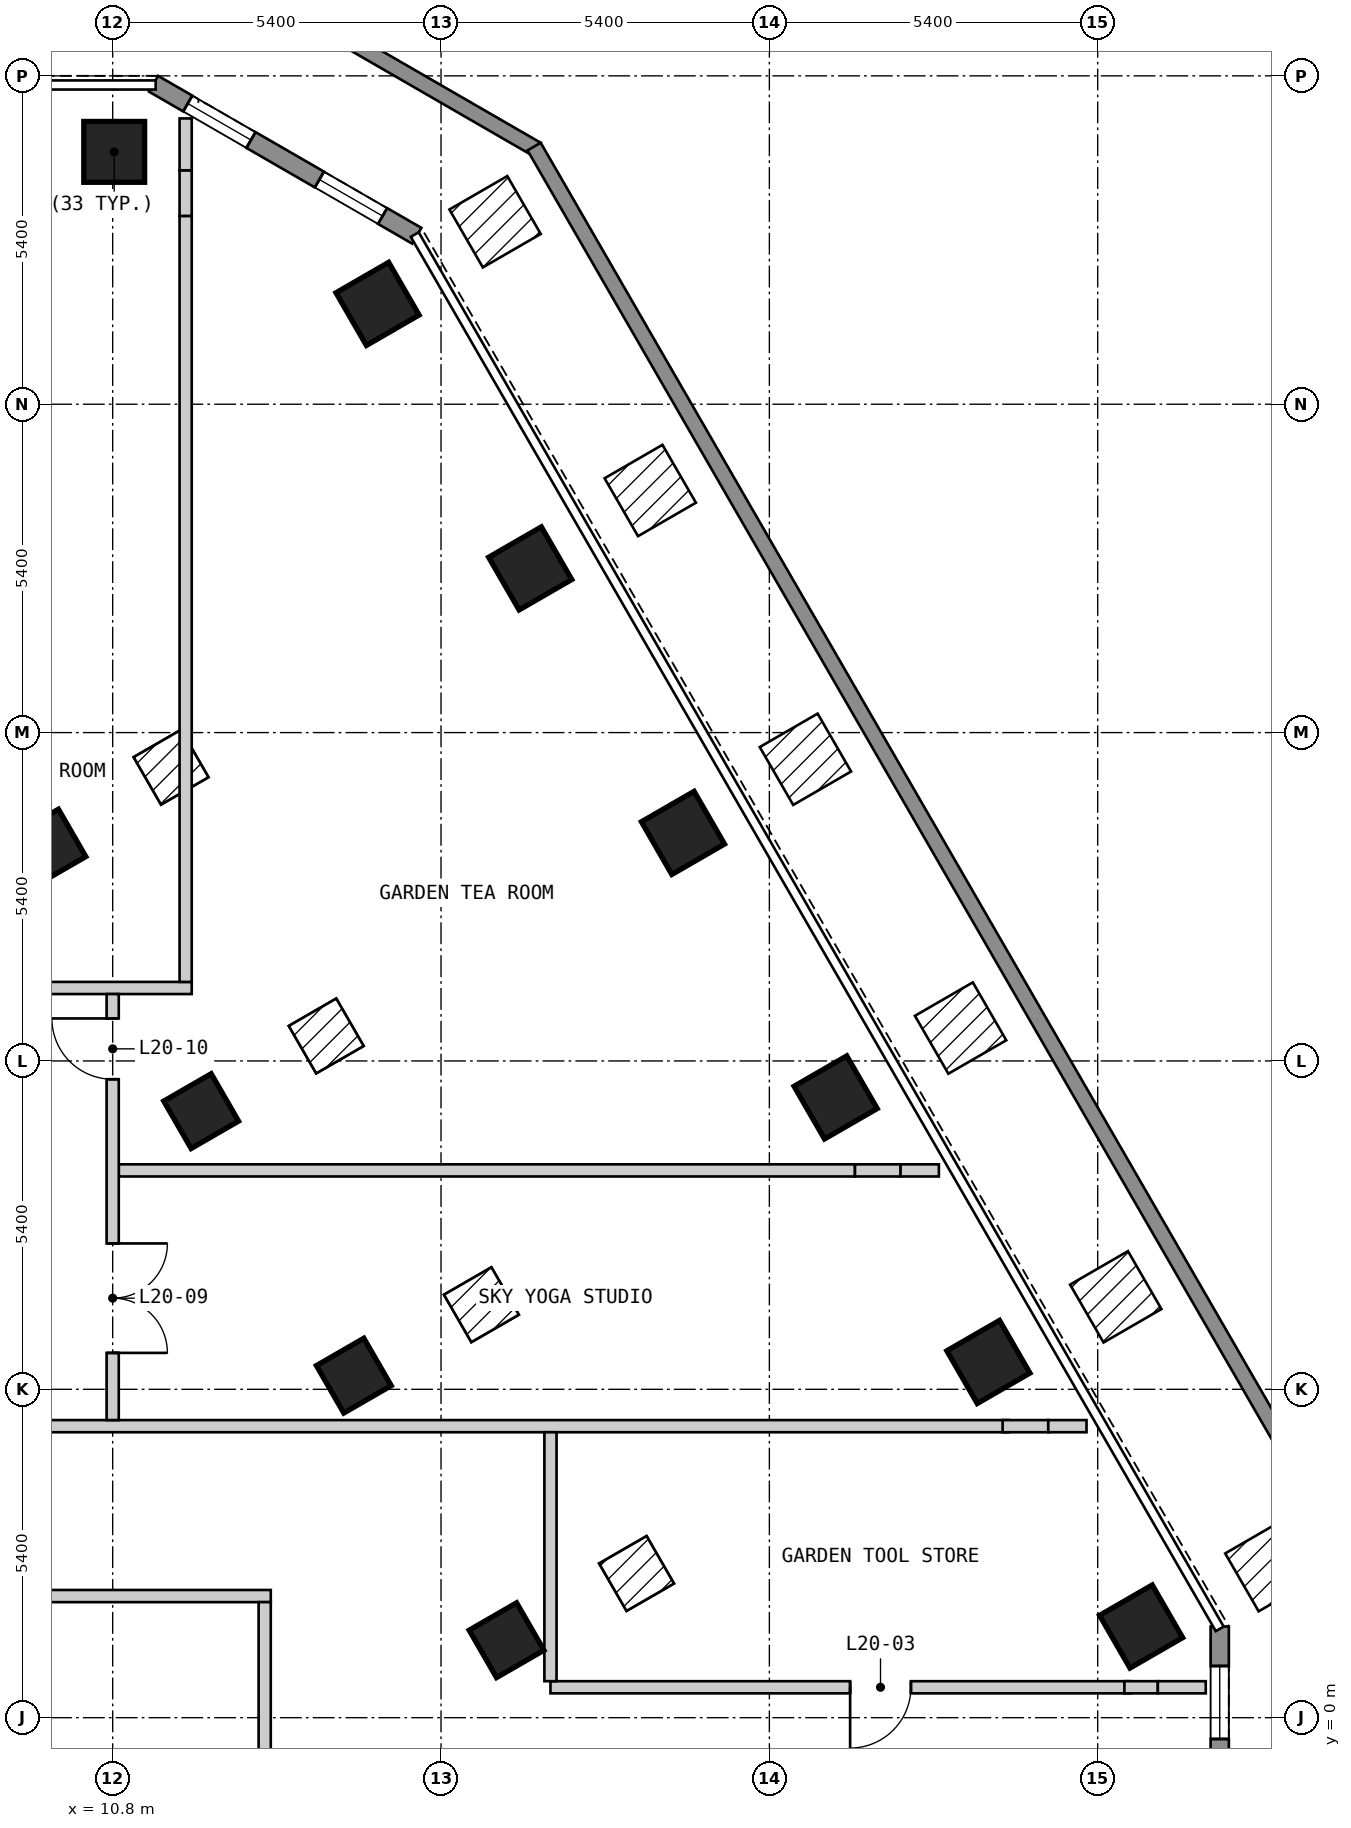
"""IFC4 building model, lengths in metres.
Left out: names, types, materials, properties, quantities, classifications, styles, units other than length and angle.
Written with IfcOpenShell. Run it as: python <this file> out.ifc"""

import sys

from ifc_helpers import new_model, si_unit, direction, frame, frame_2d, origin, origin_2d, place, context, subcontext, project, spatial, polyline, rectangle, outline, extrude, element, fill, save


model = new_model("IFC4")
c1 = context("Model", 3, precision=1e-05, world=origin(), true_north=direction((0.0, 1.0)))
c2 = subcontext(c1, "Body", "Model", "MODEL_VIEW")
j1 = project(units=[si_unit("LENGTHUNIT", "METRE"), si_unit("PLANEANGLEUNIT", "RADIAN")], contexts=[c1])
p1 = place(None, origin())
s1 = spatial("IfcSite", under=j1, at=p1, CompositionType="ELEMENT")
p2 = place(p1, origin())
s2 = spatial("IfcBuilding", under=s1, at=p2, CompositionType="ELEMENT")
p3 = place(p2, frame((0.0, 0.0, 66.0)))
s3 = spatial("IfcBuildingStorey", under=s2, at=p3, CompositionType="ELEMENT", Elevation=66.0)
for number, where, z_axis, x_axis in (
    (1, (10.825, 25.75, 0.0), (0.0, 0.0, 1.0), (-1.0, 0.0, 0.0)),
    (2, (27.714, 1.499, 0.0), (0.0, 0.0, 1.0), (-0.5, 0.866, 0.0)),
    (3, (25.202, 5.85, 0.0), (0.0, 0.0, 1.0), (-0.5, 0.866, 0.0)),
    (4, (22.69, 10.2, 0.0), (0.0, 0.0, 1.0), (-0.5, 0.866, 0.0)),
    (5, (20.179, 14.55, 0.0), (0.0, 0.0, 1.0), (-0.5, 0.866, 0.0)),
    (6, (17.667, 18.9, 0.0), (0.0, 0.0, 1.0), (-0.5, 0.866, 0.0)),
    (7, (15.156, 23.25, 0.0), (0.0, 0.0, 1.0), (-0.5, 0.866, 0.0)),
):
    element("IfcColumn", number, at=place(p3, frame(where, z_axis=z_axis, x_axis=x_axis)), inside=s3, PredefinedType="COLUMN", context=c2, shape_type="SweptSolid", body=[
        extrude(rectangle(XDim=1.0, YDim=1.0, at=origin_2d()), origin(), (0.0, 0.0, 1.0), 6.0),
    ])
for number, where, z_axis, x_axis in (
    (8, (17.278, 1.274, 0.0), (0.0, 0.0, 1.0), (-0.5, 0.866, 0.0)),
    (9, (14.766, 5.625, 0.0), (0.0, 0.0, 1.0), (-0.5, 0.866, 0.0)),
    (10, (12.255, 9.975, 0.0), (0.0, 0.0, 1.0), (-0.5, 0.866, 0.0)),
    (11, (9.743, 14.325, 0.0), (0.0, 0.0, 1.0), (-0.5, 0.866, 0.0)),
):
    element("IfcColumn", number, at=place(p3, frame(where, z_axis=z_axis, x_axis=x_axis)), inside=s3, PredefinedType="COLUMN", context=c2, shape_type="SweptSolid", body=[
        extrude(rectangle(XDim=0.9, YDim=0.9, at=origin_2d()), origin(), (0.0, 0.0, 1.0), 6.0),
    ])
p4 = place(p3, frame((29.007, -3.5, 0.0), z_axis=(0.0, 0.0, 1.0), x_axis=(0.0, 1.0, 0.0)))
e12 = element("IfcWall", 12, at=p4, inside=s3, PredefinedType="SOLIDWALL", context=c2, shape_type="SweptSolid", body=[
    extrude(outline(polyline([(0.0, -0.15), (5.0, -0.15), (4.92, 0.15), (0.08, 0.15), (0.0, -0.15)])), origin(), (0.0, 0.0, 1.0), 5.7),
])
p5 = place(p4, frame((0.65, 0.0, 0.15)))
e13 = element("IfcOpeningElement", 13, at=p5, cuts=e12, PredefinedType="OPENING", context=c2, shape_type="SweptSolid", body=[
    extrude(rectangle(XDim=1.2, YDim=2.1, at=frame_2d((0.6, 1.05))), frame((0.0, 0.16, 0.0), z_axis=(0.0, -1.0, 0.0), x_axis=(1.0, 0.0, 0.0)), (0.0, 0.0, 1.0), 0.32),
])
p6 = place(p4, frame((3.15, 0.0, 0.15)))
e14 = element("IfcOpeningElement", 14, at=p6, cuts=e12, PredefinedType="OPENING", context=c2, shape_type="SweptSolid", body=[
    extrude(rectangle(XDim=1.2, YDim=2.1, at=frame_2d((0.6, 1.05))), frame((0.0, 0.16, 0.0), z_axis=(0.0, -1.0, 0.0), x_axis=(1.0, 0.0, 0.0)), (0.0, 0.0, 1.0), 0.32),
])
p7 = place(p3, frame((15.802, 24.37, 0.0), z_axis=(0.0, 0.0, 1.0), x_axis=(-0.866022959057, 0.500004234368, 0.0)))
e15 = element("IfcWall", 15, at=p7, inside=s3, PredefinedType="SOLIDWALL", context=c2, shape_type="SweptSolid", body=[
    extrude(outline(polyline([(0.0, -0.15), (5.0, -0.15), (4.92, 0.15), (0.08, 0.15), (0.0, -0.15)])), origin(), (0.0, 0.0, 1.0), 5.7),
])
p8 = place(p7, frame((0.65, 0.0, 0.15)))
e16 = element("IfcOpeningElement", 16, at=p8, cuts=e15, PredefinedType="OPENING", context=c2, shape_type="SweptSolid", body=[
    extrude(rectangle(XDim=1.2, YDim=2.1, at=frame_2d((0.6, 1.05))), frame((0.0, 0.16, 0.0), z_axis=(0.0, -1.0, 0.0), x_axis=(1.0, 0.0, 0.0)), (0.0, 0.0, 1.0), 0.32),
])
p9 = place(p7, frame((3.15, 0.0, 0.15)))
e17 = element("IfcOpeningElement", 17, at=p9, cuts=e15, PredefinedType="OPENING", context=c2, shape_type="SweptSolid", body=[
    extrude(rectangle(XDim=1.2, YDim=2.1, at=frame_2d((0.6, 1.05))), frame((0.0, 0.16, 0.0), z_axis=(0.0, -1.0, 0.0), x_axis=(1.0, 0.0, 0.0)), (0.0, 0.0, 1.0), 0.32),
])
p10 = place(p3, frame((13.448, 28.292, 0.0), z_axis=(0.0, 0.0, 1.0), x_axis=(0.865889515344, -0.500235291855, 0.0)))
e18 = element("IfcWall", 18, at=p10, inside=s3, PredefinedType="PARAPET", context=c2, shape_type="SweptSolid", body=[
    extrude(outline(polyline([(0.067, -0.125), (4.933, -0.125), (5.0, 0.125), (0.0, 0.125), (0.067, -0.125)])), origin(), (0.0, 0.0, 1.0), 1.6),
])
p11 = place(p3, frame((17.731, 25.837, 0.0), z_axis=(0.0, 0.0, 1.0), x_axis=(0.500044695558, -0.865999597254, 0.0)))
e19 = element("IfcWall", 19, at=p11, inside=s3, PredefinedType="PARAPET", context=c2, shape_type="SweptSolid", body=[
    extrude(outline(polyline([(0.067, -0.125), (26.953, -0.125), (27.02, 0.125), (0.0, 0.125), (0.067, -0.125)])), origin(), (0.0, 0.0, 1.0), 1.6),
])
p12 = place(p3, frame((18.0, 0.5, 0.0), z_axis=(0.0, 0.0, 1.0), x_axis=(1.0, 0.0, 0.0)))
e20 = element("IfcWall", 20, at=p12, inside=s3, PredefinedType="PARTITIONING", context=c2, shape_type="SweptSolid", body=[
    extrude(rectangle(XDim=9.539, YDim=0.2, at=frame_2d((4.77, 0.0))), origin(), (0.0, 0.0, 1.0), 5.7),
])
p13 = place(p12, frame((5.928, 0.0, 0.0), z_axis=(0.0, 0.0, 1.0), x_axis=(-1.0, 0.0, 0.0)))
e21 = element("IfcOpeningElement", 21, at=p13, cuts=e20, PredefinedType="OPENING", context=c2, shape_type="SweptSolid", body=[
    extrude(rectangle(XDim=1.0, YDim=2.1, at=frame_2d((0.5, 1.05))), frame((0.0, 0.11, 0.0), z_axis=(0.0, -1.0, 0.0), x_axis=(1.0, 0.0, 0.0)), (0.0, 0.0, 1.0), 0.22),
])
p14 = place(p3, frame((27.439, 0.5, 0.0), z_axis=(0.0, 0.0, 1.0), x_axis=(1.0, 0.0, 0.0)))
e22 = element("IfcWall", 22, at=p14, inside=s3, PredefinedType="PARTITIONING", context=c2, shape_type="SweptSolid", body=[
    extrude(rectangle(XDim=0.55, YDim=0.2, at=frame_2d((0.275, 0.0))), origin(), (0.0, 0.0, 1.0), 5.02),
])
p15 = place(p3, frame((27.989, 0.5, 0.0), z_axis=(0.0, 0.0, 1.0), x_axis=(1.0, 0.0, 0.0)))
e23 = element("IfcWall", 23, at=p15, inside=s3, PredefinedType="PARTITIONING", context=c2, shape_type="SweptSolid", body=[
    extrude(rectangle(XDim=0.788, YDim=0.2, at=frame_2d((0.394, 0.0))), origin(), (0.0, 0.0, 1.0), 5.7),
])
p16 = place(p3, frame((-22.0, 2.0, 0.0), z_axis=(0.0, 0.0, 1.0), x_axis=(1.0, 0.0, 0.0)))
e24 = element("IfcWall", 24, at=p16, inside=s3, PredefinedType="PARTITIONING", context=c2, shape_type="SweptSolid", body=[
    extrude(rectangle(XDim=35.4, YDim=0.2, at=frame_2d((17.7, 0.0))), origin(), (0.0, 0.0, 1.0), 5.7),
])
p17 = place(p16, frame((3.89, 0.0, 0.0), z_axis=(0.0, 0.0, 1.0), x_axis=(-1.0, 0.0, 0.0)))
e25 = element("IfcOpeningElement", 25, at=p17, cuts=e24, PredefinedType="OPENING", context=c2, shape_type="SweptSolid", body=[
    extrude(rectangle(XDim=1.0, YDim=2.1, at=frame_2d((0.5, 1.05))), frame((0.0, 0.11, 0.0), z_axis=(0.0, -1.0, 0.0), x_axis=(1.0, 0.0, 0.0)), (0.0, 0.0, 1.0), 0.22),
])
p18 = place(p16, frame((21.1, 0.0, 0.0)))
e26 = element("IfcOpeningElement", 26, at=p18, cuts=e24, PredefinedType="OPENING", context=c2, shape_type="SweptSolid", body=[
    extrude(rectangle(XDim=1.8, YDim=2.1, at=frame_2d((0.9, 1.05))), frame((0.0, 0.11, 0.0), z_axis=(0.0, -1.0, 0.0), x_axis=(1.0, 0.0, 0.0)), (0.0, 0.0, 1.0), 0.22),
])
p19 = place(p16, frame((9.316, 0.0, 0.0)))
e27 = element("IfcOpeningElement", 27, at=p19, cuts=e24, PredefinedType="OPENING", context=c2, shape_type="SweptSolid", body=[
    extrude(rectangle(XDim=1.0, YDim=2.1, at=frame_2d((0.5, 1.05))), frame((0.0, 0.11, 0.0), z_axis=(0.0, -1.0, 0.0), x_axis=(1.0, 0.0, 0.0)), (0.0, 0.0, 1.0), 0.22),
])
p20 = place(p16, frame((13.102, 0.0, 0.0)))
e28 = element("IfcOpeningElement", 28, at=p20, cuts=e24, PredefinedType="OPENING", context=c2, shape_type="SweptSolid", body=[
    extrude(rectangle(XDim=1.8, YDim=2.1, at=frame_2d((0.9, 1.05))), frame((0.0, 0.11, 0.0), z_axis=(0.0, -1.0, 0.0), x_axis=(1.0, 0.0, 0.0)), (0.0, 0.0, 1.0), 0.22),
])
p21 = place(p3, frame((8.089, 4.794, 0.0), z_axis=(0.0, 0.0, 1.0), x_axis=(1.0, 0.0, 0.0)))
e29 = element("IfcWall", 29, at=p21, inside=s3, PredefinedType="PARTITIONING", context=c2, shape_type="SweptSolid", body=[
    extrude(rectangle(XDim=17.447, YDim=0.2, at=frame_2d((8.723, 0.0))), origin(), (0.0, 0.0, 1.0), 5.7),
])
p22 = place(p3, frame((25.436, 4.794, 0.0), z_axis=(0.0, 0.0, 1.0), x_axis=(1.0, 0.0, 0.0)))
e30 = element("IfcWall", 30, at=p22, inside=s3, PredefinedType="PARTITIONING", context=c2, shape_type="SweptSolid", body=[
    extrude(rectangle(XDim=0.751, YDim=0.2, at=frame_2d((0.375, 0.0))), origin(), (0.0, 0.0, 1.0), 5.02),
])
p23 = place(p3, frame((26.187, 4.794, 0.0), z_axis=(0.0, 0.0, 1.0), x_axis=(1.0, 0.0, 0.0)))
e31 = element("IfcWall", 31, at=p23, inside=s3, PredefinedType="PARTITIONING", context=c2, shape_type="SweptSolid", body=[
    extrude(rectangle(XDim=0.629, YDim=0.2, at=frame_2d((0.314, 0.0))), origin(), (0.0, 0.0, 1.0), 5.7),
])
p24 = place(p3, frame((10.9, 9.0, 0.0), z_axis=(0.0, 0.0, 1.0), x_axis=(1.0, 0.0, 0.0)))
e32 = element("IfcWall", 32, at=p24, inside=s3, PredefinedType="PARTITIONING", context=c2, shape_type="SweptSolid", body=[
    extrude(rectangle(XDim=12.108, YDim=0.2, at=frame_2d((6.054, 0.0))), origin(), (0.0, 0.0, 1.0), 5.7),
])
p25 = place(p3, frame((23.008, 9.0, 0.0), z_axis=(0.0, 0.0, 1.0), x_axis=(1.0, 0.0, 0.0)))
e33 = element("IfcWall", 33, at=p25, inside=s3, PredefinedType="PARTITIONING", context=c2, shape_type="SweptSolid", body=[
    extrude(rectangle(XDim=0.75, YDim=0.2, at=frame_2d((0.375, 0.0))), origin(), (0.0, 0.0, 1.0), 5.02),
])
p26 = place(p3, frame((23.758, 9.0, 0.0), z_axis=(0.0, 0.0, 1.0), x_axis=(1.0, 0.0, 0.0)))
e34 = element("IfcWall", 34, at=p26, inside=s3, PredefinedType="PARTITIONING", context=c2, shape_type="SweptSolid", body=[
    extrude(rectangle(XDim=0.63, YDim=0.2, at=frame_2d((0.315, 0.0))), origin(), (0.0, 0.0, 1.0), 5.7),
])
p27 = place(p3, frame((6.466, 12.0, 0.0), z_axis=(0.0, 0.0, 1.0), x_axis=(1.0, 0.0, 0.0)))
e35 = element("IfcWall", 35, at=p27, inside=s3, PredefinedType="PARTITIONING", context=c2, shape_type="SweptSolid", body=[
    extrude(rectangle(XDim=5.634, YDim=0.2, at=frame_2d((2.817, 0.0))), origin(), (0.0, 0.0, 1.0), 5.7),
])
p28 = place(p3, frame((10.8, 4.894, 0.0), z_axis=(0.0, 0.0, 1.0), x_axis=(0.0, 1.0, 0.0)))
e36 = element("IfcWall", 36, at=p28, inside=s3, PredefinedType="PARTITIONING", context=c2, shape_type="SweptSolid", body=[
    extrude(rectangle(XDim=7.006, YDim=0.2, at=frame_2d((3.503, 0.0))), origin(), (0.0, 0.0, 1.0), 5.7),
])
p29 = place(p28, frame((2.905, 0.0, 0.0), z_axis=(0.0, 0.0, 1.0), x_axis=(-1.0, 0.0, 0.0)))
e37 = element("IfcOpeningElement", 37, at=p29, cuts=e36, PredefinedType="OPENING", context=c2, shape_type="SweptSolid", body=[
    extrude(rectangle(XDim=1.8, YDim=2.1, at=frame_2d((0.9, 1.05))), frame((0.0, 0.11, 0.0), z_axis=(0.0, -1.0, 0.0), x_axis=(1.0, 0.0, 0.0)), (0.0, 0.0, 1.0), 0.22),
])
p30 = place(p28, frame((6.605, 0.0, 0.0), z_axis=(0.0, 0.0, 1.0), x_axis=(-1.0, 0.0, 0.0)))
e38 = element("IfcOpeningElement", 38, at=p30, cuts=e36, PredefinedType="OPENING", context=c2, shape_type="SweptSolid", body=[
    extrude(rectangle(XDim=1.0, YDim=2.1, at=frame_2d((0.5, 1.05))), frame((0.0, 0.11, 0.0), z_axis=(0.0, -1.0, 0.0), x_axis=(1.0, 0.0, 0.0)), (0.0, 0.0, 1.0), 0.22),
])
p31 = place(p3, frame((12.0, 12.1, 0.0), z_axis=(0.0, 0.0, 1.0), x_axis=(0.0, 1.0, 0.0)))
e39 = element("IfcWall", 39, at=p31, inside=s3, PredefinedType="PARTITIONING", context=c2, shape_type="SweptSolid", body=[
    extrude(rectangle(XDim=12.597, YDim=0.2, at=frame_2d((6.298, 0.0))), origin(), (0.0, 0.0, 1.0), 5.7),
])
p32 = place(p3, frame((12.0, 24.697, 0.0), z_axis=(0.0, 0.0, 1.0), x_axis=(0.0, 1.0, 0.0)))
e40 = element("IfcWall", 40, at=p32, inside=s3, PredefinedType="PARTITIONING", context=c2, shape_type="SweptSolid", body=[
    extrude(rectangle(XDim=0.75, YDim=0.2, at=frame_2d((0.375, 0.0))), origin(), (0.0, 0.0, 1.0), 5.02),
])
p33 = place(p3, frame((12.0, 25.447, 0.0), z_axis=(0.0, 0.0, 1.0), x_axis=(0.0, 1.0, 0.0)))
e41 = element("IfcWall", 41, at=p33, inside=s3, PredefinedType="PARTITIONING", context=c2, shape_type="SweptSolid", body=[
    extrude(rectangle(XDim=0.853, YDim=0.2, at=frame_2d((0.427, 0.0))), origin(), (0.0, 0.0, 1.0), 5.7),
])
p34 = place(p3, frame((13.3, -4.88, 0.0), z_axis=(0.0, 0.0, 1.0), x_axis=(0.0, 1.0, 0.0)))
e42 = element("IfcWall", 42, at=p34, inside=s3, PredefinedType="PARTITIONING", context=c2, shape_type="SweptSolid", body=[
    extrude(rectangle(XDim=6.78, YDim=0.2, at=frame_2d((3.39, 0.0))), origin(), (0.0, 0.0, 1.0), 5.7),
])
p35 = place(p3, frame((18.0, 0.6, 0.0), z_axis=(0.0, 0.0, 1.0), x_axis=(0.0, 1.0, 0.0)))
e43 = element("IfcWall", 43, at=p35, inside=s3, PredefinedType="PARTITIONING", context=c2, shape_type="SweptSolid", body=[
    extrude(rectangle(XDim=4.094, YDim=0.2, at=frame_2d((2.047, 0.0))), origin(), (0.0, 0.0, 1.0), 5.7),
])
p36 = place(p6, origin())
e44 = element("IfcWindow", 44, at=p36, inside=s3, PartitioningType="SINGLE_PANEL", PredefinedType="WINDOW", context=c2, shape_type="SweptSolid", body=[
    extrude(rectangle(XDim=1.2, YDim=2.1, at=frame_2d((0.6, 1.05))), frame((0.0, 0.03, 0.0), z_axis=(0.0, -1.0, 0.0), x_axis=(1.0, 0.0, 0.0)), (0.0, 0.0, 1.0), 0.06),
])
fill(e14, e44)
p37 = place(p8, origin())
e45 = element("IfcWindow", 45, at=p37, inside=s3, PartitioningType="SINGLE_PANEL", PredefinedType="WINDOW", context=c2, shape_type="SweptSolid", body=[
    extrude(rectangle(XDim=1.2, YDim=2.1, at=frame_2d((0.6, 1.05))), frame((0.0, 0.03, 0.0), z_axis=(0.0, -1.0, 0.0), x_axis=(1.0, 0.0, 0.0)), (0.0, 0.0, 1.0), 0.06),
])
fill(e16, e45)
p38 = place(p9, origin())
e46 = element("IfcWindow", 46, at=p38, inside=s3, PartitioningType="SINGLE_PANEL", PredefinedType="WINDOW", context=c2, shape_type="SweptSolid", body=[
    extrude(rectangle(XDim=1.2, YDim=2.1, at=frame_2d((0.6, 1.05))), frame((0.0, 0.03, 0.0), z_axis=(0.0, -1.0, 0.0), x_axis=(1.0, 0.0, 0.0)), (0.0, 0.0, 1.0), 0.06),
])
fill(e17, e46)
p39 = place(p13, origin())
e47 = element("IfcDoor", 47, at=p39, inside=s3, OperationType="SINGLE_SWING_RIGHT", PredefinedType="DOOR", context=c2, shape_type="SweptSolid", body=[
    extrude(rectangle(XDim=1.0, YDim=2.1, at=frame_2d((0.5, 1.05))), frame((0.0, 0.025, 0.0), z_axis=(0.0, -1.0, 0.0), x_axis=(1.0, 0.0, 0.0)), (0.0, 0.0, 1.0), 0.05),
])
fill(e21, e47)
p40 = place(p29, origin())
e48 = element("IfcDoor", 48, at=p40, inside=s3, OperationType="DOUBLE_DOOR_SINGLE_SWING", PredefinedType="DOOR", context=c2, shape_type="SweptSolid", body=[
    extrude(rectangle(XDim=1.8, YDim=2.1, at=frame_2d((0.9, 1.05))), frame((0.0, 0.025, 0.0), z_axis=(0.0, -1.0, 0.0), x_axis=(1.0, 0.0, 0.0)), (0.0, 0.0, 1.0), 0.05),
])
fill(e37, e48)
p41 = place(p30, origin())
e49 = element("IfcDoor", 49, at=p41, inside=s3, OperationType="SINGLE_SWING_LEFT", PredefinedType="DOOR", context=c2, shape_type="SweptSolid", body=[
    extrude(rectangle(XDim=1.0, YDim=2.1, at=frame_2d((0.5, 1.05))), frame((0.0, 0.025, 0.0), z_axis=(0.0, -1.0, 0.0), x_axis=(1.0, 0.0, 0.0)), (0.0, 0.0, 1.0), 0.05),
])
fill(e38, e49)
save(model, sys.argv[1])
